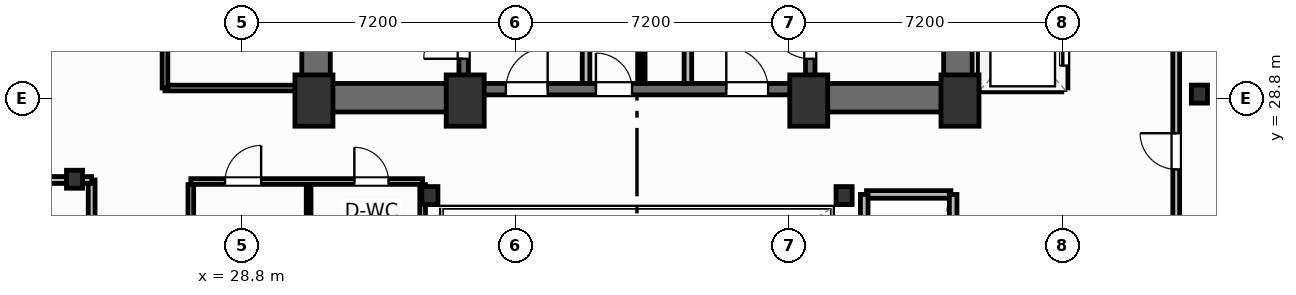
"""IFC4 building model, lengths in metres.
Left out: names, types, materials, properties, quantities, classifications, styles, units other than length and angle.
Written with IfcOpenShell. Run it as: python <this file> out.ifc"""

import sys

from ifc_helpers import new_model, si_unit, direction, frame, frame_2d, origin, origin_2d, place, context, subcontext, project, spatial, rectangle, i_section, extrude, element, fill, save


model = new_model("IFC4")
c1 = context("Model", 3, precision=1e-05, world=origin(), true_north=direction((0.0, 1.0)))
c2 = subcontext(c1, "Body", "Model", "MODEL_VIEW")
j1 = project(units=[si_unit("LENGTHUNIT", "METRE"), si_unit("PLANEANGLEUNIT", "RADIAN")], contexts=[c1])
p1 = place(None, origin())
s1 = spatial("IfcSite", under=j1, at=p1, CompositionType="ELEMENT")
p2 = place(p1, origin())
s2 = spatial("IfcBuilding", under=s1, at=p2, CompositionType="ELEMENT")
p3 = place(p2, frame((0.0, 0.0, 132.8)))
s3 = spatial("IfcBuildingStorey", under=s2, at=p3, CompositionType="ELEMENT", Elevation=132.8)
for number, where, z_axis, x_axis in (
    (1, (30.7, 28.75, 0.0), (0.0, 0.0, 1.0), (1.0, 0.0, 0.0)),
    (2, (34.68, 28.75, 0.0), (0.0, 0.0, 1.0), (1.0, 0.0, 0.0)),
    (3, (43.72, 28.75, 0.0), (0.0, 0.0, 1.0), (1.0, 0.0, 0.0)),
    (4, (47.7, 28.75, 0.0), (0.0, 0.0, 1.0), (1.0, 0.0, 0.0)),
):
    element("IfcColumn", number, at=place(p3, frame(where, z_axis=z_axis, x_axis=x_axis)), inside=s3, PredefinedType="COLUMN", context=c2, shape_type="SweptSolid", body=[
        extrude(rectangle(XDim=1.0, YDim=1.35, at=origin_2d()), origin(), (0.0, 0.0, 1.0), 3.7),
    ])
for number, where, z_axis, x_axis in (
    (5, (33.75, 26.25, 0.0), (0.0, 0.0, 1.0), (1.0, 0.0, 0.0)),
    (6, (44.65, 26.25, 0.0), (0.0, 0.0, 1.0), (1.0, 0.0, 0.0)),
    (7, (24.4, 26.68, 0.0), (0.0, 0.0, 1.0), (1.0, 0.0, 0.0)),
    (8, (54.0, 28.92, 0.0), (0.0, 0.0, 1.0), (1.0, 0.0, 0.0)),
):
    element("IfcColumn", number, at=place(p3, frame(where, z_axis=z_axis, x_axis=x_axis)), inside=s3, PredefinedType="COLUMN", context=c2, shape_type="SweptSolid", body=[
        extrude(i_section(OverallWidth=0.424, OverallDepth=0.474, WebThickness=0.048, FlangeThickness=0.077, FilletRadius=0.025, at=origin_2d()), origin(), (0.0, 0.0, 1.0), 3.7),
    ])
for number, where, z_axis, x_axis in (
    (9, (30.755, 29.2, 0.0), (0.0, 0.0, 1.0), (0.0, 1.0, 0.0)),
    (10, (47.645, 29.2, 0.0), (0.0, 0.0, 1.0), (0.0, 1.0, 0.0)),
):
    element("IfcWall", number, at=place(p3, frame(where, z_axis=z_axis, x_axis=x_axis)), inside=s3, PredefinedType="SHEAR", context=c2, shape_type="SweptSolid", body=[
        extrude(rectangle(XDim=9.22, YDim=0.75, at=frame_2d((4.61, 0.0))), origin(), (0.0, 0.0, 1.0), 3.45),
    ])
p4 = place(p3, frame((30.38, 28.825, 0.0), z_axis=(0.0, 0.0, 1.0), x_axis=(1.0, 0.0, 0.0)))
e11 = element("IfcWall", 11, at=p4, inside=s3, PredefinedType="SHEAR", context=c2, shape_type="SweptSolid", body=[
    extrude(rectangle(XDim=4.42, YDim=0.75, at=frame_2d((2.21, 0.0))), origin(), (0.0, 0.0, 1.0), 3.45),
])
p5 = place(p3, frame((43.6, 28.825, 0.0), z_axis=(0.0, 0.0, 1.0), x_axis=(1.0, 0.0, 0.0)))
e12 = element("IfcWall", 12, at=p5, inside=s3, PredefinedType="SHEAR", context=c2, shape_type="SweptSolid", body=[
    extrude(rectangle(XDim=4.42, YDim=0.75, at=frame_2d((2.21, 0.0))), origin(), (0.0, 0.0, 1.0), 3.45),
])
p6 = place(p3, frame((34.8, 29.05, 0.0), z_axis=(0.0, 0.0, 1.0), x_axis=(1.0, 0.0, 0.0)))
e13 = element("IfcWall", 13, at=p6, inside=s3, PredefinedType="SHEAR", context=c2, shape_type="SweptSolid", body=[
    extrude(rectangle(XDim=8.8, YDim=0.3, at=frame_2d((4.4, 0.0))), origin(), (0.0, 0.0, 1.0), 3.45),
])
p7 = place(p6, frame((0.95, 0.0, 0.0)))
e14 = element("IfcOpeningElement", 14, at=p7, cuts=e13, PredefinedType="OPENING", context=c2, shape_type="SweptSolid", body=[
    extrude(rectangle(XDim=1.1, YDim=2.15, at=frame_2d((0.55, 1.075))), frame((0.0, 0.16, 0.0), z_axis=(0.0, -1.0, 0.0), x_axis=(1.0, 0.0, 0.0)), (0.0, 0.0, 1.0), 0.32),
])
p8 = place(p6, frame((6.75, 0.0, 0.0)))
e15 = element("IfcOpeningElement", 15, at=p8, cuts=e13, PredefinedType="OPENING", context=c2, shape_type="SweptSolid", body=[
    extrude(rectangle(XDim=1.1, YDim=2.15, at=frame_2d((0.55, 1.075))), frame((0.0, 0.16, 0.0), z_axis=(0.0, -1.0, 0.0), x_axis=(1.0, 0.0, 0.0)), (0.0, 0.0, 1.0), 0.32),
])
p9 = place(p6, frame((3.32, 0.0, 0.0)))
e16 = element("IfcOpeningElement", 16, at=p9, cuts=e13, PredefinedType="OPENING", context=c2, shape_type="SweptSolid", body=[
    extrude(rectangle(XDim=0.95, YDim=2.15, at=frame_2d((0.475, 1.075))), frame((0.0, 0.16, 0.0), z_axis=(0.0, -1.0, 0.0), x_axis=(1.0, 0.0, 0.0)), (0.0, 0.0, 1.0), 0.32),
])
p10 = place(p3, frame((34.64, 29.2, 0.0), z_axis=(0.0, 0.0, 1.0), x_axis=(0.0, 1.0, 0.0)))
e17 = element("IfcWall", 17, at=p10, inside=s3, PredefinedType="SHEAR", context=c2, shape_type="SweptSolid", body=[
    extrude(rectangle(XDim=9.22, YDim=0.25, at=frame_2d((4.61, 0.0))), origin(), (0.0, 0.0, 1.0), 3.45),
])
p11 = place(p10, frame((0.65, 0.0, 0.0)))
e18 = element("IfcOpeningElement", 18, at=p11, cuts=e17, PredefinedType="OPENING", context=c2, shape_type="SweptSolid", body=[
    extrude(rectangle(XDim=1.05, YDim=2.15, at=frame_2d((0.525, 1.075))), frame((0.0, 0.135, 0.0), z_axis=(0.0, -1.0, 0.0), x_axis=(1.0, 0.0, 0.0)), (0.0, 0.0, 1.0), 0.27),
])
p12 = place(p3, frame((43.76, 29.2, 0.0), z_axis=(0.0, 0.0, 1.0), x_axis=(0.0, 1.0, 0.0)))
e19 = element("IfcWall", 19, at=p12, inside=s3, PredefinedType="SHEAR", context=c2, shape_type="SweptSolid", body=[
    extrude(rectangle(XDim=9.22, YDim=0.25, at=frame_2d((4.61, 0.0))), origin(), (0.0, 0.0, 1.0), 3.45),
])
p13 = place(p12, frame((0.65, 0.0, 0.0)))
e20 = element("IfcOpeningElement", 20, at=p13, cuts=e19, PredefinedType="OPENING", context=c2, shape_type="SweptSolid", body=[
    extrude(rectangle(XDim=1.05, YDim=2.15, at=frame_2d((0.525, 1.075))), frame((0.0, 0.135, 0.0), z_axis=(0.0, -1.0, 0.0), x_axis=(1.0, 0.0, 0.0)), (0.0, 0.0, 1.0), 0.27),
])
p14 = place(p3, frame((24.85, 19.24, 0.0), z_axis=(0.0, 0.0, 1.0), x_axis=(0.0, 1.0, 0.0)))
e21 = element("IfcWall", 21, at=p14, inside=s3, PredefinedType="PARTITIONING", context=c2, shape_type="SweptSolid", body=[
    extrude(rectangle(XDim=7.42, YDim=0.18, at=frame_2d((3.71, 0.0))), origin(), (0.0, 0.0, 1.0), 3.45),
])
p15 = place(p14, frame((2.4, 0.0, 0.0)))
e22 = element("IfcOpeningElement", 22, at=p15, cuts=e21, PredefinedType="OPENING", context=c2, shape_type="SweptSolid", body=[
    extrude(rectangle(XDim=0.92, YDim=2.05, at=frame_2d((0.46, 1.025))), frame((0.0, 0.1, 0.0), z_axis=(0.0, -1.0, 0.0), x_axis=(1.0, 0.0, 0.0)), (0.0, 0.0, 1.0), 0.2),
])
p16 = place(p3, frame((2.073, 26.66, 0.0), z_axis=(0.0, 0.0, 1.0), x_axis=(1.0, 0.0, 0.0)))
e23 = element("IfcWall", 23, at=p16, inside=s3, PredefinedType="PARTITIONING", context=c2, shape_type="SweptSolid", body=[
    extrude(rectangle(XDim=22.777, YDim=0.18, at=frame_2d((11.388, 0.0))), origin(), (0.0, 0.0, 1.0), 2.662),
])
p17 = place(p3, frame((53.39, 19.24, 0.0), z_axis=(0.0, 0.0, 1.0), x_axis=(0.0, 1.0, 0.0)))
e24 = element("IfcWall", 24, at=p17, inside=s3, PredefinedType="PARTITIONING", context=c2, shape_type="SweptSolid", body=[
    extrude(rectangle(XDim=20.06, YDim=0.18, at=frame_2d((10.03, 0.0))), origin(), (0.0, 0.0, 1.0), 3.45),
])
p18 = place(p17, frame((7.7, 0.0, 0.0)))
e25 = element("IfcOpeningElement", 25, at=p18, cuts=e24, PredefinedType="OPENING", context=c2, shape_type="SweptSolid", body=[
    extrude(rectangle(XDim=0.95, YDim=2.05, at=frame_2d((0.475, 1.025))), frame((0.0, 0.1, 0.0), z_axis=(0.0, -1.0, 0.0), x_axis=(1.0, 0.0, 0.0)), (0.0, 0.0, 1.0), 0.2),
])
for number, where, z_axis, x_axis in (
    (26, (37.86, 29.2, 0.0), (0.0, 0.0, 1.0), (0.0, 1.0, 0.0)),
    (27, (40.54, 29.2, 0.0), (0.0, 0.0, 1.0), (0.0, 1.0, 0.0)),
):
    element("IfcWall", number, at=place(p3, frame(where, z_axis=z_axis, x_axis=x_axis)), inside=s3, PredefinedType="PARTITIONING", context=c2, shape_type="SweptSolid", body=[
        extrude(rectangle(XDim=5.18, YDim=0.2, at=frame_2d((2.59, 0.0))), origin(), (0.0, 0.0, 1.0), 3.45),
    ])
p19 = place(p3, frame((39.35, 29.2, 0.0), z_axis=(0.0, 0.0, 1.0), x_axis=(0.0, 1.0, 0.0)))
e28 = element("IfcWall", 28, at=p19, inside=s3, PredefinedType="PARTITIONING", context=c2, shape_type="SweptSolid", body=[
    extrude(rectangle(XDim=5.22, YDim=0.125, at=frame_2d((2.61, 0.0))), origin(), (0.0, 0.0, 1.0), 3.45),
])
p20 = place(p19, frame((2.05, 0.0, 0.0)))
e29 = element("IfcOpeningElement", 29, at=p20, cuts=e28, PredefinedType="OPENING", context=c2, shape_type="SweptSolid", body=[
    extrude(rectangle(XDim=0.85, YDim=2.05, at=frame_2d((0.425, 1.025))), frame((0.0, 0.073, 0.0), z_axis=(0.0, -1.0, 0.0), x_axis=(1.0, 0.0, 0.0)), (0.0, 0.0, 1.0), 0.145),
])
p21 = place(p3, frame((27.46, 26.62, 0.0), z_axis=(0.0, 0.0, 1.0), x_axis=(1.0, 0.0, 0.0)))
e30 = element("IfcWall", 30, at=p21, inside=s3, PredefinedType="PARTITIONING", context=c2, shape_type="SweptSolid", body=[
    extrude(rectangle(XDim=6.1, YDim=0.15, at=frame_2d((3.05, 0.0))), origin(), (0.0, 0.0, 1.0), 2.662),
])
p22 = place(p21, frame((0.9, 0.0, 0.0)))
e31 = element("IfcOpeningElement", 31, at=p22, cuts=e30, PredefinedType="OPENING", context=c2, shape_type="SweptSolid", body=[
    extrude(rectangle(XDim=0.95, YDim=2.05, at=frame_2d((0.475, 1.025))), frame((0.0, 0.085, 0.0), z_axis=(0.0, -1.0, 0.0), x_axis=(1.0, 0.0, 0.0)), (0.0, 0.0, 1.0), 0.17),
])
p23 = place(p21, frame((4.303, 0.0, 0.0)))
e32 = element("IfcOpeningElement", 32, at=p23, cuts=e30, PredefinedType="OPENING", context=c2, shape_type="SweptSolid", body=[
    extrude(rectangle(XDim=0.9, YDim=2.05, at=frame_2d((0.45, 1.025))), frame((0.0, 0.085, 0.0), z_axis=(0.0, -1.0, 0.0), x_axis=(1.0, 0.0, 0.0)), (0.0, 0.0, 1.0), 0.17),
])
p24 = place(p3, frame((30.56, 19.38, 0.0), z_axis=(0.0, 0.0, 1.0), x_axis=(0.0, 1.0, 0.0)))
e33 = element("IfcWall", 33, at=p24, inside=s3, PredefinedType="PARTITIONING", context=c2, shape_type="SweptSolid", body=[
    extrude(rectangle(XDim=7.16, YDim=0.125, at=frame_2d((3.58, 0.0))), origin(), (0.0, 0.0, 1.0), 3.45),
])
p25 = place(p24, frame((1.4, 0.0, 0.0)))
e34 = element("IfcOpeningElement", 34, at=p25, cuts=e33, PredefinedType="OPENING", context=c2, shape_type="SweptSolid", body=[
    extrude(rectangle(XDim=0.92, YDim=2.05, at=frame_2d((0.46, 1.025))), frame((0.0, 0.073, 0.0), z_axis=(0.0, -1.0, 0.0), x_axis=(1.0, 0.0, 0.0)), (0.0, 0.0, 1.0), 0.145),
])
p26 = place(p3, frame((27.46, 19.38, 0.0), z_axis=(0.0, 0.0, 1.0), x_axis=(0.0, 1.0, 0.0)))
e35 = element("IfcWall", 35, at=p26, inside=s3, PredefinedType="PARTITIONING", context=c2, shape_type="SweptSolid", body=[
    extrude(rectangle(XDim=7.16, YDim=0.15, at=frame_2d((3.58, 0.0))), origin(), (0.0, 0.0, 1.0), 3.45),
])
p27 = place(p3, frame((33.56, 19.38, 0.0), z_axis=(0.0, 0.0, 1.0), x_axis=(0.0, 1.0, 0.0)))
e36 = element("IfcWall", 36, at=p27, inside=s3, PredefinedType="PARTITIONING", context=c2, shape_type="SweptSolid", body=[
    extrude(rectangle(XDim=7.16, YDim=0.15, at=frame_2d((3.58, 0.0))), origin(), (0.0, 0.0, 1.0), 2.824),
])
p28 = place(p3, frame((26.78, 29.08, 0.0), z_axis=(0.0, 0.0, 1.0), x_axis=(1.0, 0.0, 0.0)))
e37 = element("IfcWall", 37, at=p28, inside=s3, PredefinedType="PARTITIONING", context=c2, shape_type="SweptSolid", body=[
    extrude(rectangle(XDim=3.6, YDim=0.15, at=frame_2d((1.8, 0.0))), origin(), (0.0, 0.0, 1.0), 3.45),
])
p29 = place(p3, frame((26.78, 29.08, 0.0), z_axis=(0.0, 0.0, 1.0), x_axis=(0.0, 1.0, 0.0)))
e38 = element("IfcWall", 38, at=p29, inside=s3, PredefinedType="PARTITIONING", context=c2, shape_type="SweptSolid", body=[
    extrude(rectangle(XDim=9.18, YDim=0.15, at=frame_2d((4.59, 0.0))), origin(), (0.0, 0.0, 1.0), 3.45),
])
p30 = place(p29, frame((2.4, 0.0, 0.0)))
e39 = element("IfcOpeningElement", 39, at=p30, cuts=e38, PredefinedType="OPENING", context=c2, shape_type="SweptSolid", body=[
    extrude(rectangle(XDim=0.95, YDim=2.05, at=frame_2d((0.475, 1.025))), frame((0.0, 0.085, 0.0), z_axis=(0.0, -1.0, 0.0), x_axis=(1.0, 0.0, 0.0)), (0.0, 0.0, 1.0), 0.17),
])
p31 = place(p3, frame((48.32, 29.08, 0.0), z_axis=(0.0, 0.0, 1.0), x_axis=(1.0, 0.0, 0.0)))
e40 = element("IfcWall", 40, at=p31, inside=s3, PredefinedType="PARTITIONING", context=c2, shape_type="SweptSolid", body=[
    extrude(rectangle(XDim=2.06, YDim=0.2, at=frame_2d((1.03, 0.0))), origin(), (0.0, 0.0, 1.0), 2.662),
])
p32 = place(p3, frame((48.28, 29.08, 0.0), z_axis=(0.0, 0.0, 1.0), x_axis=(0.0, 1.0, 0.0)))
e41 = element("IfcWall", 41, at=p32, inside=s3, PredefinedType="PARTITIONING", context=c2, shape_type="SweptSolid", body=[
    extrude(rectangle(XDim=6.89, YDim=0.2, at=frame_2d((3.445, 0.0))), origin(), (0.0, 0.0, 1.0), 3.45),
])
p33 = place(p3, frame((50.44, 29.08, 0.0), z_axis=(0.0, 0.0, 1.0), x_axis=(0.0, 1.0, 0.0)))
e42 = element("IfcWall", 42, at=p33, inside=s3, PredefinedType="PARTITIONING", context=c2, shape_type="SweptSolid", body=[
    extrude(rectangle(XDim=6.89, YDim=0.2, at=frame_2d((3.445, 0.0))), origin(), (0.0, 0.0, 1.0), 3.45),
])
p34 = place(p33, frame((0.59, 0.0, 0.0)))
e43 = element("IfcOpeningElement", 43, at=p34, cuts=e42, PredefinedType="OPENING", context=c2, shape_type="SweptSolid", body=[
    extrude(rectangle(XDim=1.1, YDim=2.15, at=frame_2d((0.55, 1.075))), frame((0.0, 0.11, 0.0), z_axis=(0.0, -1.0, 0.0), x_axis=(1.0, 0.0, 0.0)), (0.0, 0.0, 1.0), 0.22),
])
p35 = place(p33, frame((2.89, 0.0, 0.0)))
e44 = element("IfcOpeningElement", 44, at=p35, cuts=e42, PredefinedType="OPENING", context=c2, shape_type="SweptSolid", body=[
    extrude(rectangle(XDim=1.1, YDim=2.15, at=frame_2d((0.55, 1.075))), frame((0.0, 0.11, 0.0), z_axis=(0.0, -1.0, 0.0), x_axis=(1.0, 0.0, 0.0)), (0.0, 0.0, 1.0), 0.22),
])
p36 = place(p33, frame((5.19, 0.0, 0.0)))
e45 = element("IfcOpeningElement", 45, at=p36, cuts=e42, PredefinedType="OPENING", context=c2, shape_type="SweptSolid", body=[
    extrude(rectangle(XDim=1.1, YDim=2.15, at=frame_2d((0.55, 1.075))), frame((0.0, 0.11, 0.0), z_axis=(0.0, -1.0, 0.0), x_axis=(1.0, 0.0, 0.0)), (0.0, 0.0, 1.0), 0.22),
])
p37 = place(p3, frame((45.24, 26.28, 0.0), z_axis=(0.0, 0.0, 1.0), x_axis=(1.0, 0.0, 0.0)))
e46 = element("IfcWall", 46, at=p37, inside=s3, PredefinedType="PARTITIONING", context=c2, shape_type="SweptSolid", body=[
    extrude(rectangle(XDim=2.22, YDim=0.2, at=frame_2d((1.11, 0.0))), origin(), (0.0, 0.0, 1.0), 3.45),
])
for number, where, z_axis, x_axis in (
    (47, (45.18, 19.38, 0.0), (0.0, 0.0, 1.0), (0.0, 1.0, 0.0)),
    (48, (47.52, 19.38, 0.0), (0.0, 0.0, 1.0), (0.0, 1.0, 0.0)),
):
    element("IfcWall", number, at=place(p3, frame(where, z_axis=z_axis, x_axis=x_axis)), inside=s3, PredefinedType="PARTITIONING", context=c2, shape_type="SweptSolid", body=[
        extrude(rectangle(XDim=6.9, YDim=0.2, at=frame_2d((3.45, 0.0))), origin(), (0.0, 0.0, 1.0), 3.45),
    ])
p38 = place(p18, origin())
e49 = element("IfcDoor", 49, at=p38, inside=s3, OperationType="SINGLE_SWING_RIGHT", PredefinedType="DOOR", context=c2, shape_type="SweptSolid", body=[
    extrude(rectangle(XDim=0.95, YDim=2.05, at=frame_2d((0.475, 1.025))), frame((0.0, 0.025, 0.0), z_axis=(0.0, -1.0, 0.0), x_axis=(1.0, 0.0, 0.0)), (0.0, 0.0, 1.0), 0.05),
])
fill(e25, e49)
p39 = place(p11, origin())
e50 = element("IfcDoor", 50, at=p39, inside=s3, OperationType="SINGLE_SWING_LEFT", PredefinedType="DOOR", context=c2, shape_type="SweptSolid", body=[
    extrude(rectangle(XDim=1.05, YDim=2.15, at=frame_2d((0.525, 1.075))), frame((0.0, 0.025, 0.0), z_axis=(0.0, -1.0, 0.0), x_axis=(1.0, 0.0, 0.0)), (0.0, 0.0, 1.0), 0.05),
])
fill(e18, e50)
p40 = place(p13, origin())
e51 = element("IfcDoor", 51, at=p40, inside=s3, OperationType="SINGLE_SWING_RIGHT", PredefinedType="DOOR", context=c2, shape_type="SweptSolid", body=[
    extrude(rectangle(XDim=1.05, YDim=2.15, at=frame_2d((0.525, 1.075))), frame((0.0, 0.025, 0.0), z_axis=(0.0, -1.0, 0.0), x_axis=(1.0, 0.0, 0.0)), (0.0, 0.0, 1.0), 0.05),
])
fill(e20, e51)
p41 = place(p7, origin())
e52 = element("IfcDoor", 52, at=p41, inside=s3, OperationType="SINGLE_SWING_RIGHT", PredefinedType="DOOR", context=c2, shape_type="SweptSolid", body=[
    extrude(rectangle(XDim=1.1, YDim=2.15, at=frame_2d((0.55, 1.075))), frame((0.0, 0.025, 0.0), z_axis=(0.0, -1.0, 0.0), x_axis=(1.0, 0.0, 0.0)), (0.0, 0.0, 1.0), 0.05),
])
fill(e14, e52)
p42 = place(p8, origin())
e53 = element("IfcDoor", 53, at=p42, inside=s3, OperationType="SINGLE_SWING_LEFT", PredefinedType="DOOR", context=c2, shape_type="SweptSolid", body=[
    extrude(rectangle(XDim=1.1, YDim=2.15, at=frame_2d((0.55, 1.075))), frame((0.0, 0.025, 0.0), z_axis=(0.0, -1.0, 0.0), x_axis=(1.0, 0.0, 0.0)), (0.0, 0.0, 1.0), 0.05),
])
fill(e15, e53)
p43 = place(p9, origin())
e54 = element("IfcDoor", 54, at=p43, inside=s3, OperationType="SINGLE_SWING_LEFT", PredefinedType="DOOR", context=c2, shape_type="SweptSolid", body=[
    extrude(rectangle(XDim=0.95, YDim=2.15, at=frame_2d((0.475, 1.075))), frame((0.0, 0.025, 0.0), z_axis=(0.0, -1.0, 0.0), x_axis=(1.0, 0.0, 0.0)), (0.0, 0.0, 1.0), 0.05),
])
fill(e16, e54)
p44 = place(p22, origin())
e55 = element("IfcDoor", 55, at=p44, inside=s3, OperationType="SINGLE_SWING_RIGHT", PredefinedType="DOOR", context=c2, shape_type="SweptSolid", body=[
    extrude(rectangle(XDim=0.95, YDim=2.05, at=frame_2d((0.475, 1.025))), frame((0.0, 0.025, 0.0), z_axis=(0.0, -1.0, 0.0), x_axis=(1.0, 0.0, 0.0)), (0.0, 0.0, 1.0), 0.05),
])
fill(e31, e55)
p45 = place(p23, origin())
e56 = element("IfcDoor", 56, at=p45, inside=s3, OperationType="SINGLE_SWING_LEFT", PredefinedType="DOOR", context=c2, shape_type="SweptSolid", body=[
    extrude(rectangle(XDim=0.9, YDim=2.05, at=frame_2d((0.45, 1.025))), frame((0.0, 0.025, 0.0), z_axis=(0.0, -1.0, 0.0), x_axis=(1.0, 0.0, 0.0)), (0.0, 0.0, 1.0), 0.05),
])
fill(e32, e56)
p46 = place(p34, origin())
e57 = element("IfcDoor", 57, at=p46, inside=s3, OperationType="SLIDING_TO_LEFT", PredefinedType="DOOR", context=c2, shape_type="SweptSolid", body=[
    extrude(rectangle(XDim=1.1, YDim=2.15, at=frame_2d((0.55, 1.075))), frame((0.0, 0.025, 0.0), z_axis=(0.0, -1.0, 0.0), x_axis=(1.0, 0.0, 0.0)), (0.0, 0.0, 1.0), 0.05),
])
fill(e43, e57)
save(model, sys.argv[1])
